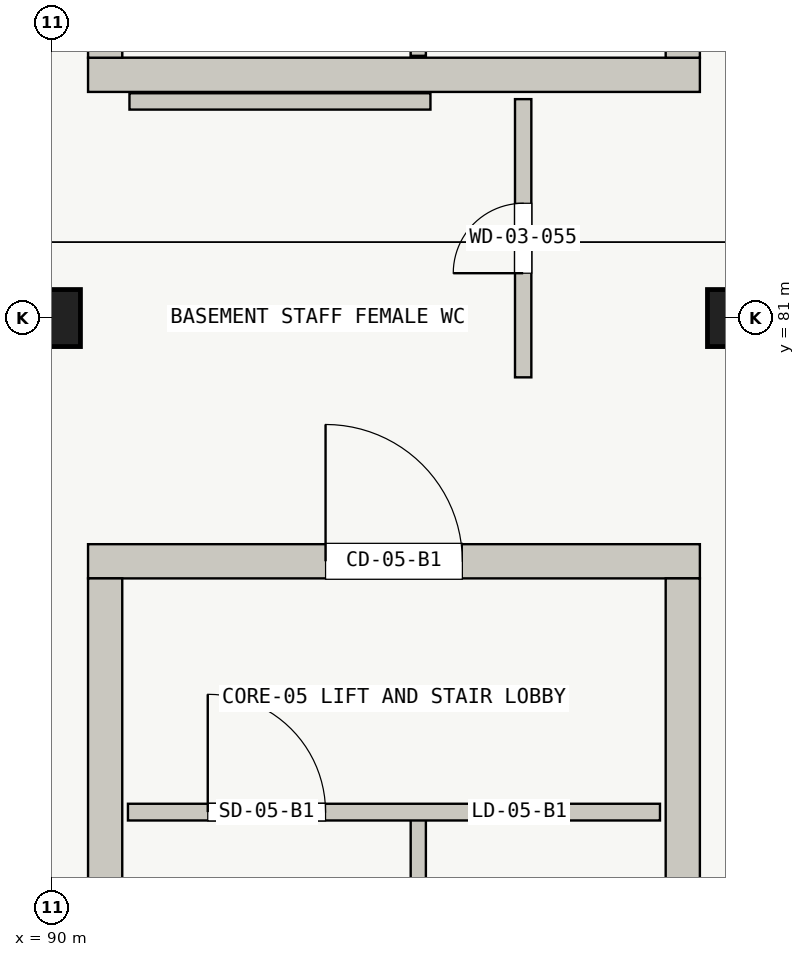
"""IFC4 building model, lengths in metres.
Left out: names, types, materials, properties, quantities, classifications, styles, units other than length and angle.
Written with IfcOpenShell. Run it as: python <this file> out.ifc"""

import sys

from ifc_helpers import new_model, si_unit, direction, frame, frame_2d, origin, origin_2d, place, context, subcontext, project, spatial, rectangle, extrude, element, fill, save


model = new_model("IFC4")
c1 = context("Model", 3, precision=1e-05, world=origin(), true_north=direction((0.0, 1.0)))
c2 = subcontext(c1, "Body", "Model", "MODEL_VIEW")
j1 = project(units=[si_unit("LENGTHUNIT", "METRE"), si_unit("PLANEANGLEUNIT", "RADIAN")], contexts=[c1])
p1 = place(None, origin())
s1 = spatial("IfcSite", under=j1, at=p1, CompositionType="ELEMENT")
p2 = place(p1, origin())
s2 = spatial("IfcBuilding", under=s1, at=p2, CompositionType="ELEMENT")
p3 = place(p2, frame((0.0, 0.0, -4.8)))
s3 = spatial("IfcBuildingStorey", under=s2, at=p3, CompositionType="ELEMENT", Elevation=-4.8)
p4 = place(p3, frame((90.475, 84.2, -0.45), z_axis=(0.0, 0.0, 1.0), x_axis=(1.0, 0.0, 0.0)))
e1 = element("IfcWall", 1, at=p4, inside=s3, PredefinedType="SHEAR", context=c2, shape_type="SweptSolid", body=[
    extrude(rectangle(XDim=8.05, YDim=0.45, at=frame_2d((4.025, 0.0))), origin(), (0.0, 0.0, 1.0), 5.25),
])
for number, where, z_axis, x_axis in (
    (2, (90.7, 84.425, -0.45), (0.0, 0.0, 1.0), (0.0, 1.0, 0.0)),
    (3, (98.3, 84.425, -0.45), (0.0, 0.0, 1.0), (0.0, 1.0, 0.0)),
):
    element("IfcWall", number, at=place(p3, frame(where, z_axis=z_axis, x_axis=x_axis)), inside=s3, PredefinedType="SHEAR", context=c2, shape_type="SweptSolid", body=[
        extrude(rectangle(XDim=11.15, YDim=0.45, at=frame_2d((5.575, 0.0))), origin(), (0.0, 0.0, 1.0), 5.25),
    ])
p5 = place(p3, frame((90.475, 77.8, -0.45), z_axis=(0.0, 0.0, 1.0), x_axis=(1.0, 0.0, 0.0)))
e4 = element("IfcWall", 4, at=p5, inside=s3, PredefinedType="SHEAR", context=c2, shape_type="SweptSolid", body=[
    extrude(rectangle(XDim=8.05, YDim=0.45, at=frame_2d((4.025, 0.0))), origin(), (0.0, 0.0, 1.0), 5.25),
])
p6 = place(p5, frame((3.125, 0.0, 0.45)))
e5 = element("IfcOpeningElement", 5, at=p6, cuts=e4, PredefinedType="OPENING", context=c2, shape_type="SweptSolid", body=[
    extrude(rectangle(XDim=1.8, YDim=2.3, at=frame_2d((0.9, 1.15))), frame((0.0, 0.235, 0.0), z_axis=(0.0, -1.0, 0.0), x_axis=(1.0, 0.0, 0.0)), (0.0, 0.0, 1.0), 0.47),
])
for number, where, z_axis, x_axis in (
    (6, (90.7, 66.425, -0.45), (0.0, 0.0, 1.0), (0.0, 1.0, 0.0)),
    (7, (98.3, 66.425, -0.45), (0.0, 0.0, 1.0), (0.0, 1.0, 0.0)),
):
    element("IfcWall", number, at=place(p3, frame(where, z_axis=z_axis, x_axis=x_axis)), inside=s3, PredefinedType="SHEAR", context=c2, shape_type="SweptSolid", body=[
        extrude(rectangle(XDim=11.15, YDim=0.45, at=frame_2d((5.575, 0.0))), origin(), (0.0, 0.0, 1.0), 5.25),
    ])
for number, where, z_axis, x_axis in (
    (8, (90.0, 81.0, -0.45), (0.0, 0.0, 1.0), (1.0, 0.0, 0.0)),
    (9, (99.0, 81.0, -0.45), (0.0, 0.0, 1.0), (1.0, 0.0, 0.0)),
):
    element("IfcColumn", number, at=place(p3, frame(where, z_axis=z_axis, x_axis=x_axis)), inside=s3, PredefinedType="COLUMN", context=c2, shape_type="SweptSolid", body=[
        extrude(rectangle(XDim=0.9, YDim=0.9, at=origin_2d()), origin(), (0.0, 0.0, 1.0), 5.25),
    ])
for number, where, z_axis, x_axis in (
    (10, (94.82, 84.45, -0.45), (0.0, 0.0, 1.0), (0.0, 1.0, 0.0)),
    (11, (94.82, 66.45, -0.45), (0.0, 0.0, 1.0), (0.0, 1.0, 0.0)),
):
    element("IfcWall", number, at=place(p3, frame(where, z_axis=z_axis, x_axis=x_axis)), inside=s3, PredefinedType="SOLIDWALL", context=c2, shape_type="SweptSolid", body=[
        extrude(rectangle(XDim=8.0, YDim=0.2, at=frame_2d((4.0, 0.0))), origin(), (0.0, 0.0, 1.0), 5.25),
    ])
p7 = place(p3, frame((91.0, 74.5, 0.0), z_axis=(0.0, 0.0, 1.0), x_axis=(1.0, 0.0, 0.0)))
e12 = element("IfcWall", 12, at=p7, inside=s3, PredefinedType="SOLIDWALL", context=c2, shape_type="SweptSolid", body=[
    extrude(rectangle(XDim=7.0, YDim=0.22, at=frame_2d((3.5, 0.0))), origin(), (0.0, 0.0, 1.0), 4.4),
])
p8 = place(p7, frame((1.05, 0.0, 0.0)))
e13 = element("IfcOpeningElement", 13, at=p8, cuts=e12, PredefinedType="OPENING", context=c2, shape_type="SweptSolid", body=[
    extrude(rectangle(XDim=1.55, YDim=2.2, at=frame_2d((0.775, 1.1))), frame((0.0, 0.12, 0.0), z_axis=(0.0, -1.0, 0.0), x_axis=(1.0, 0.0, 0.0)), (0.0, 0.0, 1.0), 0.24),
])
p9 = place(p7, frame((4.55, 0.0, 0.0)))
e14 = element("IfcOpeningElement", 14, at=p9, cuts=e12, PredefinedType="OPENING", context=c2, shape_type="SweptSolid", body=[
    extrude(rectangle(XDim=1.2, YDim=2.2, at=frame_2d((0.6, 1.1))), frame((0.0, 0.12, 0.0), z_axis=(0.0, -1.0, 0.0), x_axis=(1.0, 0.0, 0.0)), (0.0, 0.0, 1.0), 0.24),
])
p10 = place(p3, frame((91.02, 83.85, 0.0), z_axis=(0.0, 0.0, 1.0), x_axis=(1.0, 0.0, 0.0)))
e15 = element("IfcWall", 15, at=p10, inside=s3, PredefinedType="PARTITIONING", context=c2, shape_type="SweptSolid", body=[
    extrude(rectangle(XDim=3.96, YDim=0.215, at=frame_2d((1.98, 0.0))), origin(), (0.0, 0.0, 1.0), 3.42),
])
p11 = place(p3, frame((96.2, 80.22, 0.0), z_axis=(0.0, 0.0, 1.0), x_axis=(0.0, 1.0, 0.0)))
e16 = element("IfcWall", 16, at=p11, inside=s3, PredefinedType="PARTITIONING", context=c2, shape_type="SweptSolid", body=[
    extrude(rectangle(XDim=3.66, YDim=0.215, at=frame_2d((1.83, 0.0))), origin(), (0.0, 0.0, 1.0), 3.42),
])
p12 = place(p11, frame((1.37, 0.0, 0.0)))
e17 = element("IfcOpeningElement", 17, at=p12, cuts=e16, PredefinedType="OPENING", context=c2, shape_type="SweptSolid", body=[
    extrude(rectangle(XDim=0.92, YDim=2.12, at=frame_2d((0.46, 1.06))), frame((0.0, 0.117, 0.0), z_axis=(0.0, -1.0, 0.0), x_axis=(1.0, 0.0, 0.0)), (0.0, 0.0, 1.0), 0.235),
])
p13 = place(p8, origin())
e18 = element("IfcDoor", 18, at=p13, inside=s3, OperationType="SINGLE_SWING_LEFT", PredefinedType="DOOR", context=c2, shape_type="SweptSolid", body=[
    extrude(rectangle(XDim=1.55, YDim=2.2, at=frame_2d((0.775, 1.1))), frame((0.0, 0.025, 0.0), z_axis=(0.0, -1.0, 0.0), x_axis=(1.0, 0.0, 0.0)), (0.0, 0.0, 1.0), 0.05),
])
fill(e13, e18)
p14 = place(p9, origin())
e19 = element("IfcDoor", 19, at=p14, inside=s3, OperationType="SLIDING_TO_LEFT", PredefinedType="DOOR", context=c2, shape_type="SweptSolid", body=[
    extrude(rectangle(XDim=1.2, YDim=2.2, at=frame_2d((0.6, 1.1))), frame((0.0, 0.025, 0.0), z_axis=(0.0, -1.0, 0.0), x_axis=(1.0, 0.0, 0.0)), (0.0, 0.0, 1.0), 0.05),
])
fill(e14, e19)
p15 = place(p6, origin())
e20 = element("IfcDoor", 20, at=p15, inside=s3, OperationType="DOUBLE_DOOR_SINGLE_SWING", PredefinedType="DOOR", context=c2, shape_type="SweptSolid", body=[
    extrude(rectangle(XDim=1.8, YDim=2.3, at=frame_2d((0.9, 1.15))), frame((0.0, 0.025, 0.0), z_axis=(0.0, -1.0, 0.0), x_axis=(1.0, 0.0, 0.0)), (0.0, 0.0, 1.0), 0.05),
])
fill(e5, e20)
p16 = place(p12, origin())
e21 = element("IfcDoor", 21, at=p16, inside=s3, OperationType="SINGLE_SWING_LEFT", PredefinedType="DOOR", context=c2, shape_type="SweptSolid", body=[
    extrude(rectangle(XDim=0.92, YDim=2.12, at=frame_2d((0.46, 1.06))), frame((0.0, 0.025, 0.0), z_axis=(0.0, -1.0, 0.0), x_axis=(1.0, 0.0, 0.0)), (0.0, 0.0, 1.0), 0.05),
])
fill(e17, e21)
save(model, sys.argv[1])
